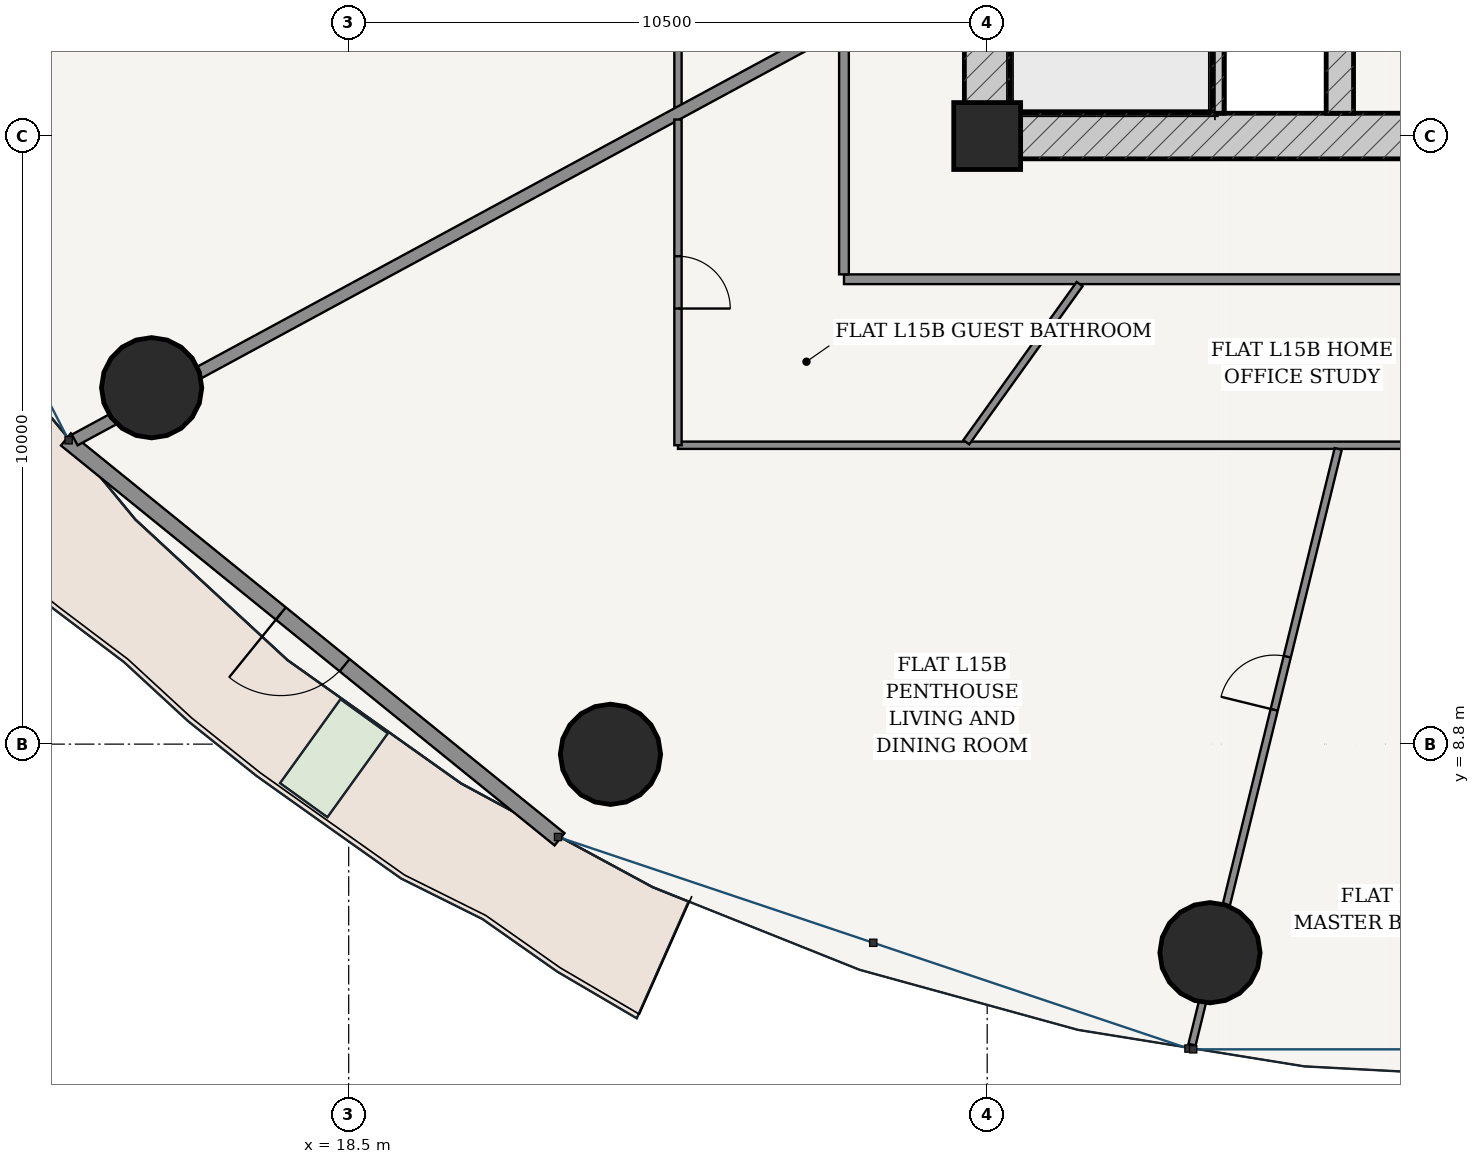
"""IFC4 building model, lengths in metres.
Left out: names, types, materials, properties, quantities, classifications, styles, units other than length and angle.
Written with IfcOpenShell. Run it as: python <this file> out.ifc"""

import sys

from ifc_helpers import new_model, si_unit, direction, frame, frame_2d, origin, origin_2d, place, context, subcontext, project, spatial, rectangle, hollow_circle, extrude, source, transform, mapped, element, fill, save


model = new_model("IFC4")
c1 = context("Model", 3, precision=1e-05, world=origin(), true_north=direction((-0.2419218956, 0.970295726276)))
c2 = subcontext(c1, "Body", "Model", "MODEL_VIEW")
j1 = project(units=[si_unit("LENGTHUNIT", "METRE"), si_unit("PLANEANGLEUNIT", "RADIAN")], contexts=[c1])
p1 = place(None, origin())
s1 = spatial("IfcSite", under=j1, at=p1, CompositionType="ELEMENT")
p2 = place(p1, origin())
s2 = spatial("IfcBuilding", under=s1, at=p2, CompositionType="ELEMENT")
p3 = place(p2, frame((0.0, 0.0, 60.0)))
s3 = spatial("IfcBuildingStorey", under=s2, at=p3, CompositionType="ELEMENT", Elevation=60.0)
p4 = place(p3, frame((29.0, 18.8, 0.0), z_axis=(0.0, 0.0, 1.0), x_axis=(1.0, 0.0, 0.0)))
e1 = element("IfcColumn", 1, at=p4, inside=s3, PredefinedType="COLUMN", context=c2, shape_type="SweptSolid", body=[
    extrude(rectangle(XDim=1.1, YDim=1.1, at=origin_2d()), origin(), (0.0, 0.0, 1.0), 3.6),
])
p5 = place(p3, frame((28.625, 18.8, 0.0), z_axis=(0.0, 0.0, 1.0), x_axis=(1.0, 0.0, 0.0)))
e2 = element("IfcWall", 2, at=p5, inside=s3, PredefinedType="SHEAR", context=c2, shape_type="SweptSolid", body=[
    extrude(rectangle(XDim=18.75, YDim=0.75, at=frame_2d((9.375, 0.0))), origin(), (0.0, 0.0, 1.0), 3.32),
])
p6 = place(p5, frame((8.95, 0.0, 0.0)))
e3 = element("IfcOpeningElement", 3, at=p6, cuts=e2, PredefinedType="OPENING", context=c2, shape_type="SweptSolid", body=[
    extrude(rectangle(XDim=0.85, YDim=2.1, at=frame_2d((0.425, 1.05))), frame((0.0, 0.385, 0.0), z_axis=(0.0, -1.0, 0.0), x_axis=(1.0, 0.0, 0.0)), (0.0, 0.0, 1.0), 0.77),
])
p7 = place(p3, frame((29.0, 19.175, 0.0), z_axis=(0.0, 0.0, 1.0), x_axis=(0.0, 1.0, 0.0)))
e4 = element("IfcWall", 4, at=p7, inside=s3, PredefinedType="SHEAR", context=c2, shape_type="SweptSolid", body=[
    extrude(rectangle(XDim=15.25, YDim=0.75, at=frame_2d((7.625, 0.0))), origin(), (0.0, 0.0, 1.0), 3.32),
])
p8 = place(p7, frame((9.875, 0.0, 0.0)))
e5 = element("IfcOpeningElement", 5, at=p8, cuts=e4, PredefinedType="OPENING", context=c2, shape_type="SweptSolid", body=[
    extrude(rectangle(XDim=1.5, YDim=2.2, at=frame_2d((0.75, 1.1))), frame((0.0, 0.385, 0.0), z_axis=(0.0, -1.0, 0.0), x_axis=(1.0, 0.0, 0.0)), (0.0, 0.0, 1.0), 0.77),
])
p9 = place(p3, frame((32.795, 19.175, 0.0), z_axis=(0.0, 0.0, 1.0), x_axis=(0.0, 1.0, 0.0)))
e6 = element("IfcWall", 6, at=p9, inside=s3, PredefinedType="SOLIDWALL", context=c2, shape_type="SweptSolid", body=[
    extrude(rectangle(XDim=7.375, YDim=0.2, at=frame_2d((3.688, 0.0))), origin(), (0.0, 0.0, 1.0), 3.32),
])
p10 = place(p3, frame((34.8, 19.175, 0.0), z_axis=(0.0, 0.0, 1.0), x_axis=(0.0, 1.0, 0.0)))
e7 = element("IfcWall", 7, at=p10, inside=s3, PredefinedType="SHEAR", context=c2, shape_type="SweptSolid", body=[
    extrude(rectangle(XDim=15.25, YDim=0.45, at=frame_2d((7.625, 0.0))), origin(), (0.0, 0.0, 1.0), 3.32),
])
p11 = place(p10, frame((7.8, 0.0, 0.0)))
e8 = element("IfcOpeningElement", 8, at=p11, cuts=e7, PredefinedType="OPENING", context=c2, shape_type="SweptSolid", body=[
    extrude(rectangle(XDim=1.05, YDim=2.15, at=frame_2d((0.525, 1.075))), frame((0.0, 0.235, 0.0), z_axis=(0.0, -1.0, 0.0), x_axis=(1.0, 0.0, 0.0)), (0.0, 0.0, 1.0), 0.47),
])
for number, where, z_axis, x_axis in (
    (9, (15.259, 14.661, 0.0), (0.0, 0.0, 1.0), (1.0, 0.0, 0.0)),
    (10, (22.805, 8.632, 0.0), (0.0, 0.0, 1.0), (1.0, 0.0, 0.0)),
    (11, (32.664, 5.37, 0.0), (0.0, 0.0, 1.0), (1.0, 0.0, 0.0)),
):
    element("IfcColumn", number, at=place(p3, frame(where, z_axis=z_axis, x_axis=x_axis)), inside=s3, PredefinedType="COLUMN", context=c2, shape_type="SweptSolid", body=[
        extrude(hollow_circle(Radius=0.825, WallThickness=0.05, at=origin_2d()), origin(), (0.0, 0.0, 1.0), 3.6),
    ])
p12 = place(p3, frame((13.85, 13.811, 0.0), z_axis=(0.0, 0.0, 1.0), x_axis=(0.777016782851, -0.629479879875, 0.0)))
e12 = element("IfcWall", 12, at=p12, inside=s3, PredefinedType="SOLIDWALL", context=c2, shape_type="SweptSolid", body=[
    extrude(rectangle(XDim=10.447, YDim=0.26, at=frame_2d((5.223, 0.0))), origin(), (0.0, 0.0, 1.0), 3.32),
])
p13 = place(p12, frame((4.548, 0.0, 0.0)))
e13 = element("IfcOpeningElement", 13, at=p13, cuts=e12, PredefinedType="OPENING", context=c2, shape_type="SweptSolid", body=[
    extrude(rectangle(XDim=1.35, YDim=2.2, at=frame_2d((0.675, 1.1))), frame((0.0, 0.14, 0.0), z_axis=(0.0, -1.0, 0.0), x_axis=(1.0, 0.0, 0.0)), (0.0, 0.0, 1.0), 0.28),
])
p14 = place(p3, frame((26.645, 16.445, 0.0), z_axis=(0.0, 0.0, 1.0), x_axis=(1.0, 0.0, 0.0)))
e14 = element("IfcWall", 14, at=p14, inside=s3, PredefinedType="PARTITIONING", context=c2, shape_type="SweptSolid", body=[
    extrude(rectangle(XDim=22.71, YDim=0.16, at=frame_2d((11.355, 0.0))), origin(), (0.0, 0.0, 1.0), 2.688),
])
p15 = place(p3, frame((26.645, 16.525, 0.0), z_axis=(0.0, 0.0, 1.0), x_axis=(0.0, 1.0, 0.0)))
e15 = element("IfcWall", 15, at=p15, inside=s3, PredefinedType="PARTITIONING", context=c2, shape_type="SweptSolid", body=[
    extrude(rectangle(XDim=20.55, YDim=0.16, at=frame_2d((10.275, 0.0))), origin(), (0.0, 0.0, 1.0), 2.688),
])
p16 = place(p15, frame((16.837, 0.0, 0.0)))
e16 = element("IfcOpeningElement", 16, at=p16, cuts=e15, PredefinedType="OPENING", context=c2, shape_type="SweptSolid", body=[
    extrude(rectangle(XDim=0.98, YDim=2.2, at=frame_2d((0.49, 1.1))), frame((0.0, 0.09, 0.0), z_axis=(0.0, -1.0, 0.0), x_axis=(1.0, 0.0, 0.0)), (0.0, 0.0, 1.0), 0.18),
])
p17 = place(p3, frame((23.915, 19.276, 0.0), z_axis=(0.0, 0.0, 1.0), x_axis=(0.0, 1.0, 0.0)))
e17 = element("IfcWall", 17, at=p17, inside=s3, PredefinedType="PARTITIONING", context=c2, shape_type="SweptSolid", body=[
    extrude(rectangle(XDim=20.609, YDim=0.12, at=frame_2d((10.305, 0.0))), origin(), (0.0, 0.0, 1.0), 2.688),
])
p18 = place(p17, frame((15.972, 0.0, 0.0)))
e18 = element("IfcOpeningElement", 18, at=p18, cuts=e17, PredefinedType="OPENING", context=c2, shape_type="SweptSolid", body=[
    extrude(rectangle(XDim=0.9, YDim=2.15, at=frame_2d((0.45, 1.075))), frame((0.0, 0.07, 0.0), z_axis=(0.0, -1.0, 0.0), x_axis=(1.0, 0.0, 0.0)), (0.0, 0.0, 1.0), 0.14),
])
p19 = place(p17, frame((3.058, 0.0, 0.0)))
e19 = element("IfcOpeningElement", 19, at=p19, cuts=e17, PredefinedType="OPENING", context=c2, shape_type="SweptSolid", body=[
    extrude(rectangle(XDim=0.9, YDim=2.15, at=frame_2d((0.45, 1.075))), frame((0.0, 0.07, 0.0), z_axis=(0.0, -1.0, 0.0), x_axis=(1.0, 0.0, 0.0)), (0.0, 0.0, 1.0), 0.14),
])
p20 = place(p3, frame((26.565, 20.608, 0.0), z_axis=(0.0, 0.0, 1.0), x_axis=(-0.879369737803, -0.476139542819, 0.0)))
e20 = element("IfcWall", 20, at=p20, inside=s3, PredefinedType="PARTITIONING", context=c2, shape_type="SweptSolid", body=[
    extrude(rectangle(XDim=14.295, YDim=0.2, at=frame_2d((7.147, 0.0))), origin(), (0.0, 0.0, 1.0), 2.688),
])
p21 = place(p3, frame((52.085, 13.715, 0.0), z_axis=(0.0, 0.0, 1.0), x_axis=(-1.0, 0.0, 0.0)))
e21 = element("IfcWall", 21, at=p21, inside=s3, PredefinedType="PARTITIONING", context=c2, shape_type="SweptSolid", body=[
    extrude(rectangle(XDim=28.17, YDim=0.12, at=frame_2d((14.085, 0.0))), origin(), (0.0, 0.0, 1.0), 2.688),
])
p22 = place(p21, frame((12.891, 0.0, 0.0)))
e22 = element("IfcOpeningElement", 22, at=p22, cuts=e21, PredefinedType="OPENING", context=c2, shape_type="SweptSolid", body=[
    extrude(rectangle(XDim=0.9, YDim=2.15, at=frame_2d((0.45, 1.075))), frame((0.0, 0.07, 0.0), z_axis=(0.0, -1.0, 0.0), x_axis=(1.0, 0.0, 0.0)), (0.0, 0.0, 1.0), 0.14),
])
p23 = place(p3, frame((23.915, 13.715, 0.0), z_axis=(0.0, 0.0, 1.0), x_axis=(0.0, 1.0, 0.0)))
e23 = element("IfcWall", 23, at=p23, inside=s3, PredefinedType="PARTITIONING", context=c2, shape_type="SweptSolid", body=[
    extrude(rectangle(XDim=5.356, YDim=0.12, at=frame_2d((2.678, 0.0))), origin(), (0.0, 0.0, 1.0), 2.999),
])
p24 = place(p23, frame((2.248, 0.0, 0.0)))
e24 = element("IfcOpeningElement", 24, at=p24, cuts=e23, PredefinedType="OPENING", context=c2, shape_type="SweptSolid", body=[
    extrude(rectangle(XDim=0.86, YDim=2.15, at=frame_2d((0.43, 1.075))), frame((0.0, 0.07, 0.0), z_axis=(0.0, -1.0, 0.0), x_axis=(1.0, 0.0, 0.0)), (0.0, 0.0, 1.0), 0.14),
])
p25 = place(p3, frame((34.773, 13.655, 0.0), z_axis=(0.0, 0.0, 1.0), x_axis=(-0.238375747469, -0.97117300365, 0.0)))
e25 = element("IfcWall", 25, at=p25, inside=s3, PredefinedType="PARTITIONING", context=c2, shape_type="SweptSolid", body=[
    extrude(rectangle(XDim=10.086, YDim=0.12, at=frame_2d((5.043, 0.0))), origin(), (0.0, 0.0, 1.0), 2.688),
])
p26 = place(p25, frame((3.518, 0.0, 0.0)))
e26 = element("IfcOpeningElement", 26, at=p26, cuts=e25, PredefinedType="OPENING", context=c2, shape_type="SweptSolid", body=[
    extrude(rectangle(XDim=0.9, YDim=2.15, at=frame_2d((0.45, 1.075))), frame((0.0, 0.07, 0.0), z_axis=(0.0, -1.0, 0.0), x_axis=(1.0, 0.0, 0.0)), (0.0, 0.0, 1.0), 0.14),
])
p27 = place(p3, frame((30.52, 16.365, 0.0), z_axis=(0.0, 0.0, 1.0), x_axis=(-0.582566008831, -0.812783393872, 0.0)))
e27 = element("IfcWall", 27, at=p27, inside=s3, PredefinedType="PARTITIONING", context=c2, shape_type="SweptSolid", body=[
    extrude(rectangle(XDim=3.198, YDim=0.12, at=frame_2d((1.599, 0.0))), origin(), (0.0, 0.0, 1.0), 3.32),
])
m1 = source(origin(), c2, "Body", "SweptSolid", [
    extrude(rectangle(XDim=1.35, YDim=2.2, at=frame_2d((0.675, 1.1))), frame((0.0, 0.025, 0.0), z_axis=(0.0, -1.0, 0.0), x_axis=(1.0, 0.0, 0.0)), (0.0, 0.0, 1.0), 0.05),
])
p28 = place(p13, frame((1.35, 0.0, 0.0), z_axis=(0.0, 0.0, 1.0), x_axis=(-1.0, 0.0, 0.0)))
e28 = element("IfcDoor", 28, at=p28, inside=s3, OperationType="SINGLE_SWING_RIGHT", PredefinedType="DOOR", context=c2, shape_type="MappedRepresentation", body=[
    mapped(m1, transform((0.0, 0.0, 0.0), scale=1.0)),
])
fill(e13, e28)
m2 = source(origin(), c2, "Body", "SweptSolid", [
    extrude(rectangle(XDim=0.9, YDim=2.15, at=frame_2d((0.45, 1.075))), frame((0.0, 0.025, 0.0), z_axis=(0.0, -1.0, 0.0), x_axis=(1.0, 0.0, 0.0)), (0.0, 0.0, 1.0), 0.05),
])
p29 = place(p26, frame((0.9, 0.0, 0.0), z_axis=(0.0, 0.0, 1.0), x_axis=(-1.0, 0.0, 0.0)))
e29 = element("IfcDoor", 29, at=p29, inside=s3, OperationType="SINGLE_SWING_LEFT", PredefinedType="DOOR", context=c2, shape_type="MappedRepresentation", body=[
    mapped(m2, transform((0.0, 0.0, 0.0), scale=1.0)),
])
fill(e26, e29)
m3 = source(origin(), c2, "Body", "SweptSolid", [
    extrude(rectangle(XDim=0.86, YDim=2.15, at=frame_2d((0.43, 1.075))), frame((0.0, 0.025, 0.0), z_axis=(0.0, -1.0, 0.0), x_axis=(1.0, 0.0, 0.0)), (0.0, 0.0, 1.0), 0.05),
])
p30 = place(p24, frame((0.86, 0.0, 0.0), z_axis=(0.0, 0.0, 1.0), x_axis=(-1.0, 0.0, 0.0)))
e30 = element("IfcDoor", 30, at=p30, inside=s3, OperationType="SINGLE_SWING_RIGHT", PredefinedType="DOOR", context=c2, shape_type="MappedRepresentation", body=[
    mapped(m3, transform((0.0, 0.0, 0.0), scale=1.0)),
])
fill(e24, e30)
save(model, sys.argv[1])
